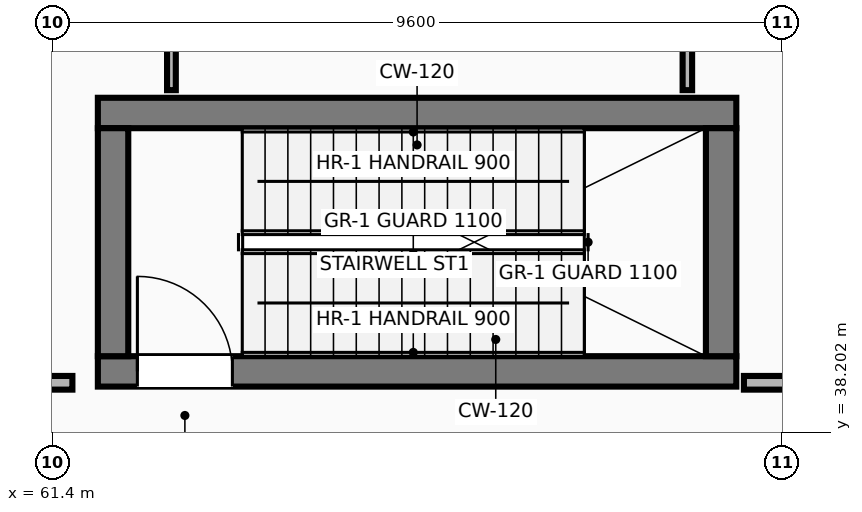
"""IFC4 building model, lengths in metres.
Left out: names, types, materials, properties, quantities, classifications, styles, units other than length and angle.
Written with IfcOpenShell. Run it as: python <this file> out.ifc"""

import sys

from ifc_helpers import new_model, si_unit, direction, frame, frame_2d, origin, place, context, subcontext, project, spatial, rectangle, extrude, element, fill, save


model = new_model("IFC4")
c1 = context("Model", 3, precision=1e-05, world=origin(), true_north=direction((0.0, 1.0)))
c2 = subcontext(c1, "Body", "Model", "MODEL_VIEW")
j1 = project(units=[si_unit("LENGTHUNIT", "METRE"), si_unit("PLANEANGLEUNIT", "RADIAN")], contexts=[c1])
p1 = place(None, origin())
s1 = spatial("IfcSite", under=j1, at=p1, CompositionType="ELEMENT")
p2 = place(p1, origin())
s2 = spatial("IfcBuilding", under=s1, at=p2, CompositionType="ELEMENT")
p3 = place(p2, origin())
s3 = spatial("IfcBuildingStorey", under=s2, at=p3, CompositionType="ELEMENT", Elevation=0.0)
p4 = place(p3, frame((62.0, 39.0, 0.0), z_axis=(0.0, 0.0, 1.0), x_axis=(1.0, 0.0, 0.0)))
e1 = element("IfcWall", 1, at=p4, inside=s3, PredefinedType="SHEAR", context=c2, shape_type="SweptSolid", body=[
    extrude(rectangle(XDim=8.4, YDim=0.4, at=frame_2d((4.2, 0.0))), origin(), (0.0, 0.0, 1.0), 5.08),
])
p5 = place(p4, frame((0.52, 0.0, 0.0)))
e2 = element("IfcOpeningElement", 2, at=p5, cuts=e1, PredefinedType="OPENING", context=c2, shape_type="SweptSolid", body=[
    extrude(rectangle(XDim=1.25, YDim=2.2, at=frame_2d((0.625, 1.1))), frame((0.0, 0.21, 0.0), z_axis=(0.0, -1.0, 0.0), x_axis=(1.0, 0.0, 0.0)), (0.0, 0.0, 1.0), 0.42),
])
p6 = place(p3, frame((70.4, 42.4, 0.0), z_axis=(0.0, 0.0, 1.0), x_axis=(-1.0, 0.0, 0.0)))
e3 = element("IfcWall", 3, at=p6, inside=s3, PredefinedType="SHEAR", context=c2, shape_type="SweptSolid", body=[
    extrude(rectangle(XDim=8.4, YDim=0.4, at=frame_2d((4.2, 0.0))), origin(), (0.0, 0.0, 1.0), 5.08),
])
for number, where, z_axis, x_axis in (
    (4, (62.2, 39.2, 0.0), (0.0, 0.0, 1.0), (0.0, 1.0, 0.0)),
    (5, (70.2, 42.2, 0.0), (0.0, 0.0, 1.0), (0.0, -1.0, 0.0)),
):
    element("IfcWall", number, at=place(p3, frame(where, z_axis=z_axis, x_axis=x_axis)), inside=s3, PredefinedType="SHEAR", context=c2, shape_type="SweptSolid", body=[
        extrude(rectangle(XDim=3.0, YDim=0.4, at=frame_2d((1.5, 0.0))), origin(), (0.0, 0.0, 1.0), 5.08),
    ])
p7 = place(p3, frame((61.665, 38.85, 0.0), z_axis=(0.0, 0.0, 1.0), x_axis=(-1.0, 0.0, 0.0)))
e6 = element("IfcWall", 6, at=p7, inside=s3, PredefinedType="PARTITIONING", context=c2, shape_type="SweptSolid", body=[
    extrude(rectangle(XDim=5.285, YDim=0.18, at=frame_2d((2.643, 0.0))), origin(), (0.0, 0.0, 1.0), 5.08),
])
p8 = place(p3, frame((62.968, 62.96, 0.0), z_axis=(0.0, 0.0, 1.0), x_axis=(0.0, -1.0, 0.0)))
e7 = element("IfcWall", 7, at=p8, inside=s3, PredefinedType="PARTITIONING", context=c2, shape_type="SweptSolid", body=[
    extrude(rectangle(XDim=20.26, YDim=0.115, at=frame_2d((10.13, 0.0))), origin(), (0.0, 0.0, 1.0), 5.08),
])
p9 = place(p3, frame((69.756, 42.7, 0.0), z_axis=(0.0, 0.0, 1.0), x_axis=(0.0, 1.0, 0.0)))
e8 = element("IfcWall", 8, at=p9, inside=s3, PredefinedType="PARTITIONING", context=c2, shape_type="SweptSolid", body=[
    extrude(rectangle(XDim=20.26, YDim=0.125, at=frame_2d((10.13, 0.0))), origin(), (0.0, 0.0, 1.0), 5.08),
])
p10 = place(p3, frame((76.304, 38.85, 0.0), z_axis=(0.0, 0.0, 1.0), x_axis=(-1.0, 0.0, 0.0)))
e9 = element("IfcWall", 9, at=p10, inside=s3, PredefinedType="PARTITIONING", context=c2, shape_type="SweptSolid", body=[
    extrude(rectangle(XDim=5.804, YDim=0.18, at=frame_2d((2.902, 0.0))), origin(), (0.0, 0.0, 1.0), 5.08),
])
p11 = place(p10, frame((3.327, 0.0, 0.0)))
e10 = element("IfcOpeningElement", 10, at=p11, cuts=e9, PredefinedType="OPENING", context=c2, shape_type="SweptSolid", body=[
    extrude(rectangle(XDim=1.65, YDim=2.3, at=frame_2d((0.825, 1.15))), frame((0.0, 0.1, 0.0), z_axis=(0.0, -1.0, 0.0), x_axis=(1.0, 0.0, 0.0)), (0.0, 0.0, 1.0), 0.2),
])
p12 = place(p5, origin())
e11 = element("IfcDoor", 11, at=p12, inside=s3, OperationType="SINGLE_SWING_LEFT", PredefinedType="DOOR", context=c2, shape_type="SweptSolid", body=[
    extrude(rectangle(XDim=1.25, YDim=2.2, at=frame_2d((0.625, 1.1))), frame((0.0, 0.025, 0.0), z_axis=(0.0, -1.0, 0.0), x_axis=(1.0, 0.0, 0.0)), (0.0, 0.0, 1.0), 0.05),
])
fill(e2, e11)
save(model, sys.argv[1])
